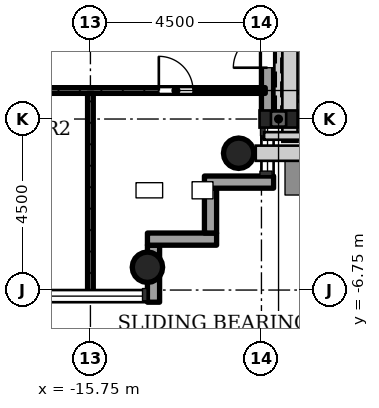
"""IFC4 building model, lengths in metres.
Left out: names, types, materials, properties, quantities, classifications, styles, units other than length and angle.
Written with IfcOpenShell. Run it as: python <this file> out.ifc"""

import sys

from ifc_helpers import new_model, si_unit, direction, frame, frame_2d, origin, origin_2d, place, context, subcontext, project, spatial, rectangle, hollow_circle, extrude, element, fill, save


model = new_model("IFC4")
c1 = context("Model", 3, precision=1e-05, world=origin(), true_north=direction((0.0, 1.0)))
c2 = subcontext(c1, "Body", "Model", "MODEL_VIEW")
j1 = project(units=[si_unit("LENGTHUNIT", "METRE"), si_unit("PLANEANGLEUNIT", "RADIAN")], contexts=[c1])
p1 = place(None, origin())
s1 = spatial("IfcSite", under=j1, at=p1, CompositionType="ELEMENT")
p2 = place(p1, origin())
s2 = spatial("IfcBuilding", under=s1, at=p2, CompositionType="ELEMENT")
p3 = place(p2, frame((0.0, 0.0, 128.7)))
s3 = spatial("IfcBuildingStorey", under=s2, at=p3, CompositionType="ELEMENT", Elevation=128.7)
for number, where, z_axis, x_axis in (
    (1, (-14.25, -6.15, 0.0), (0.0, 0.0, 1.0), (1.0, 0.0, 0.0)),
    (2, (-11.85, -3.15, 0.0), (0.0, 0.0, 1.0), (1.0, 0.0, 0.0)),
):
    element("IfcColumn", number, at=place(p3, frame(where, z_axis=z_axis, x_axis=x_axis)), inside=s3, PredefinedType="COLUMN", context=c2, shape_type="SweptSolid", body=[
        extrude(hollow_circle(Radius=0.4, WallThickness=0.028, at=origin_2d()), origin(), (0.0, 0.0, 1.0), 5.0),
    ])
p4 = place(p3, frame((-14.09, -7.07, -0.3), z_axis=(0.0, 0.0, 1.0), x_axis=(0.0, 1.0, 0.0)))
e3 = element("IfcWall", 3, at=p4, inside=s3, PredefinedType="STANDARD", context=c2, shape_type="SweptSolid", body=[
    extrude(rectangle(XDim=1.5, YDim=0.32, at=frame_2d((0.75, 0.0))), origin(), (0.0, 0.0, 1.0), 5.0),
])
p5 = place(p3, frame((-14.25, -5.41, -0.3), z_axis=(0.0, 0.0, 1.0), x_axis=(1.0, 0.0, 0.0)))
e4 = element("IfcWall", 4, at=p5, inside=s3, PredefinedType="STANDARD", context=c2, shape_type="SweptSolid", body=[
    extrude(rectangle(XDim=1.82, YDim=0.32, at=frame_2d((0.91, 0.0))), origin(), (0.0, 0.0, 1.0), 5.0),
])
p6 = place(p3, frame((-12.59, -5.25, -0.3), z_axis=(0.0, 0.0, 1.0), x_axis=(0.0, 1.0, 0.0)))
e5 = element("IfcWall", 5, at=p6, inside=s3, PredefinedType="STANDARD", context=c2, shape_type="SweptSolid", body=[
    extrude(rectangle(XDim=1.18, YDim=0.32, at=frame_2d((0.59, 0.0))), origin(), (0.0, 0.0, 1.0), 5.0),
])
p7 = place(p3, frame((-12.75, -3.91, -0.3), z_axis=(0.0, 0.0, 1.0), x_axis=(1.0, 0.0, 0.0)))
e6 = element("IfcWall", 6, at=p7, inside=s3, PredefinedType="STANDARD", context=c2, shape_type="SweptSolid", body=[
    extrude(rectangle(XDim=1.82, YDim=0.32, at=frame_2d((0.91, 0.0))), origin(), (0.0, 0.0, 1.0), 5.0),
])
p8 = place(p3, frame((-11.09, -2.25, 0.0), z_axis=(0.0, 0.0, 1.0), x_axis=(0.0, 1.0, 0.0)))
e7 = element("IfcWall", 7, at=p8, inside=s3, PredefinedType="STANDARD", context=c2, shape_type="SweptSolid", body=[
    extrude(rectangle(XDim=4.5, YDim=0.32, at=frame_2d((2.25, 0.0))), origin(), (0.0, 0.0, 1.0), 4.7),
])
p9 = place(p8, frame((1.35, 0.0, 0.0)))
e8 = element("IfcOpeningElement", 8, at=p9, cuts=e7, PredefinedType="OPENING", context=c2, shape_type="SweptSolid", body=[
    extrude(rectangle(XDim=1.8, YDim=2.1, at=frame_2d((0.9, 1.05))), frame((0.0, 0.17, 0.0), z_axis=(0.0, -1.0, 0.0), x_axis=(1.0, 0.0, 0.0)), (0.0, 0.0, 1.0), 0.34),
])
p10 = place(p3, frame((-20.25, -1.5, 0.0), z_axis=(0.0, 0.0, 1.0), x_axis=(1.0, 0.0, 0.0)))
e9 = element("IfcWall", 9, at=p10, inside=s3, PredefinedType="PARTITIONING", context=c2, shape_type="SweptSolid", body=[
    extrude(rectangle(XDim=9.1, YDim=0.15, at=frame_2d((4.55, 0.0))), origin(), (0.0, 0.0, 1.0), 4.58),
])
p11 = place(p10, frame((1.8, 0.0, 0.0)))
e10 = element("IfcOpeningElement", 10, at=p11, cuts=e9, PredefinedType="OPENING", context=c2, shape_type="SweptSolid", body=[
    extrude(rectangle(XDim=0.9, YDim=2.1, at=frame_2d((0.45, 1.05))), frame((0.0, 0.085, 0.0), z_axis=(0.0, -1.0, 0.0), x_axis=(1.0, 0.0, 0.0)), (0.0, 0.0, 1.0), 0.17),
])
p12 = place(p10, frame((6.3, 0.0, 0.0)))
e11 = element("IfcOpeningElement", 11, at=p12, cuts=e9, PredefinedType="OPENING", context=c2, shape_type="SweptSolid", body=[
    extrude(rectangle(XDim=0.9, YDim=2.1, at=frame_2d((0.45, 1.05))), frame((0.0, 0.085, 0.0), z_axis=(0.0, -1.0, 0.0), x_axis=(1.0, 0.0, 0.0)), (0.0, 0.0, 1.0), 0.17),
])
p13 = place(p3, frame((-15.75, -1.575, 0.0), z_axis=(0.0, 0.0, 1.0), x_axis=(0.0, -1.0, 0.0)))
e12 = element("IfcWall", 12, at=p13, inside=s3, PredefinedType="PARTITIONING", context=c2, shape_type="SweptSolid", body=[
    extrude(rectangle(XDim=5.275, YDim=0.15, at=frame_2d((2.638, 0.0))), origin(), (0.0, 0.0, 1.0), 4.58),
])
p14 = place(p9, origin())
e13 = element("IfcDoor", 13, at=p14, inside=s3, OperationType="DOUBLE_DOOR_SINGLE_SWING", PredefinedType="DOOR", context=c2, shape_type="SweptSolid", body=[
    extrude(rectangle(XDim=1.8, YDim=2.1, at=frame_2d((0.9, 1.05))), frame((0.0, 0.025, 0.0), z_axis=(0.0, -1.0, 0.0), x_axis=(1.0, 0.0, 0.0)), (0.0, 0.0, 1.0), 0.05),
])
fill(e8, e13)
p15 = place(p12, origin())
e14 = element("IfcDoor", 14, at=p15, inside=s3, OperationType="SINGLE_SWING_RIGHT", PredefinedType="DOOR", context=c2, shape_type="SweptSolid", body=[
    extrude(rectangle(XDim=0.9, YDim=2.1, at=frame_2d((0.45, 1.05))), frame((0.0, 0.025, 0.0), z_axis=(0.0, -1.0, 0.0), x_axis=(1.0, 0.0, 0.0)), (0.0, 0.0, 1.0), 0.05),
])
fill(e11, e14)
save(model, sys.argv[1])
